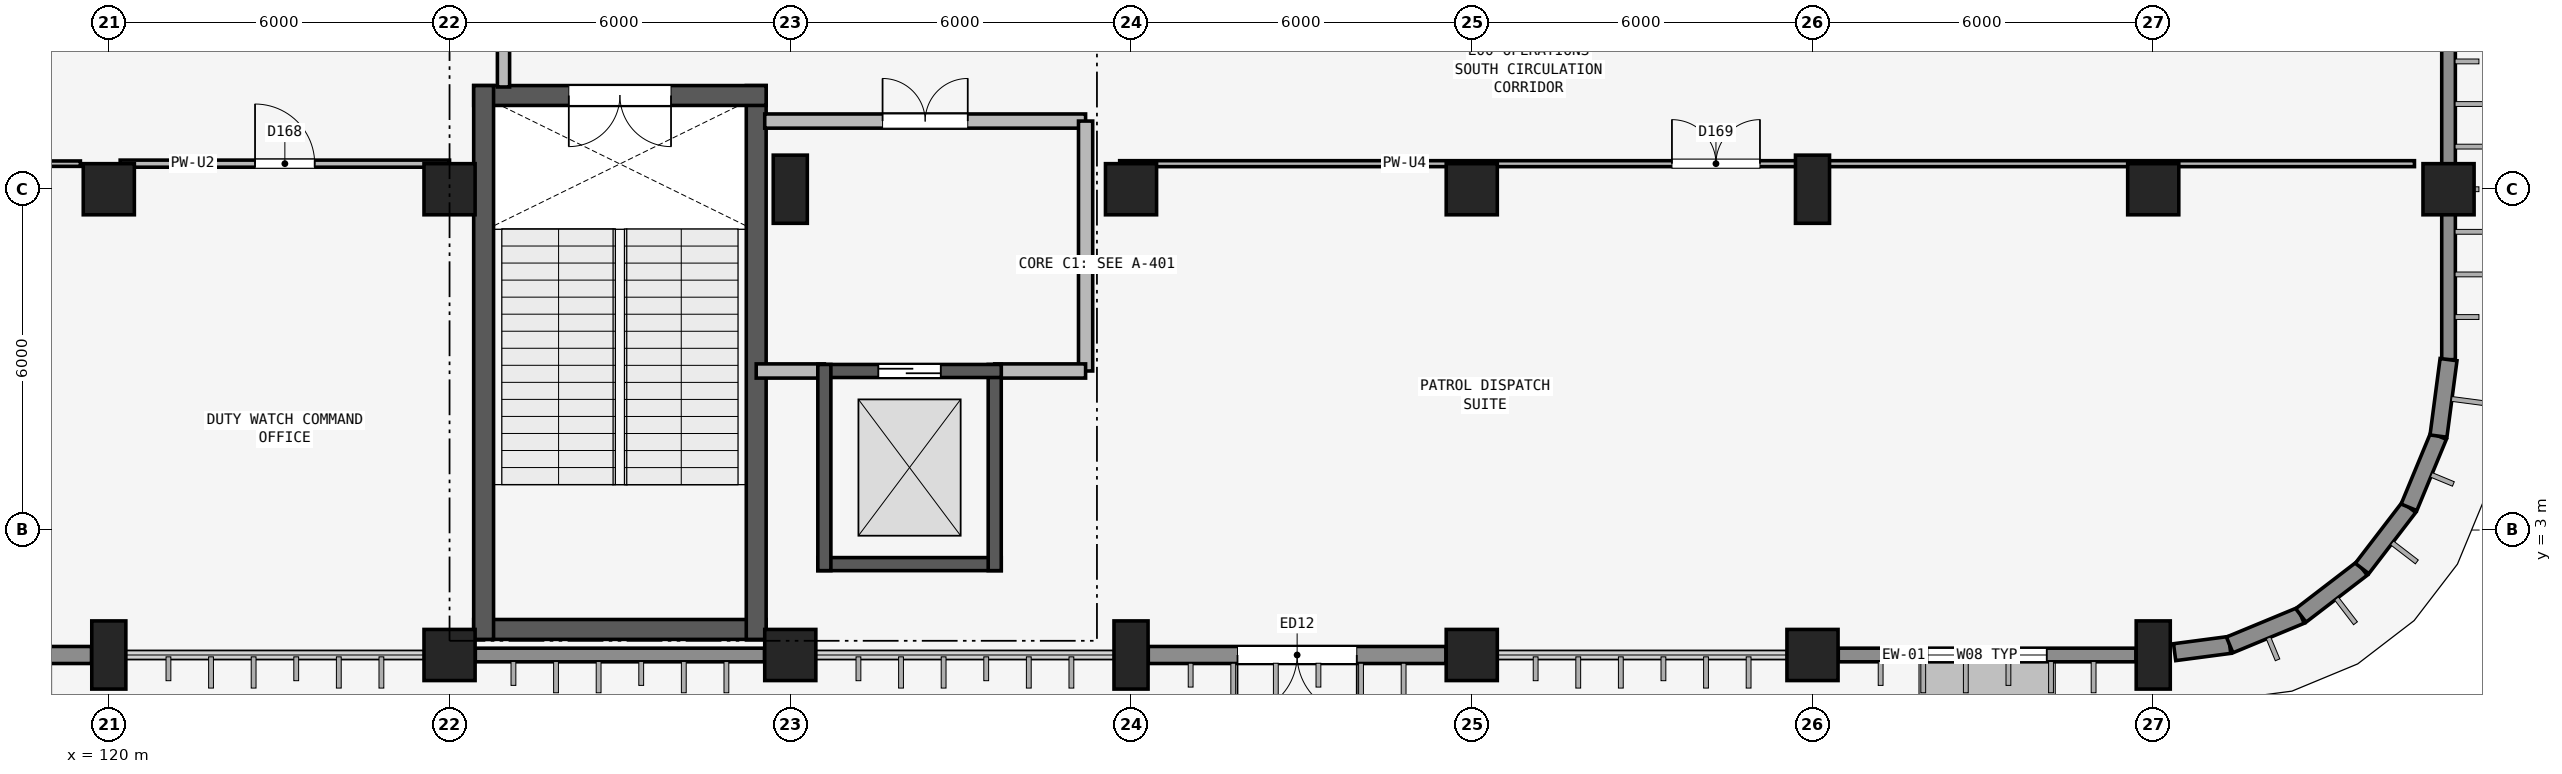
"""IFC4 building model, lengths in metres.
Left out: names, types, materials, properties, quantities, classifications, styles, units other than length and angle.
Written with IfcOpenShell. Run it as: python <this file> out.ifc"""

import sys

from ifc_helpers import new_model, si_unit, direction, frame, frame_2d, origin, origin_2d, place, context, subcontext, project, spatial, rectangle, extrude, element, fill, save


model = new_model("IFC4")
c1 = context("Model", 3, precision=1e-05, world=origin(), true_north=direction((0.0, 1.0)))
c2 = subcontext(c1, "Body", "Model", "MODEL_VIEW")
j1 = project(units=[si_unit("LENGTHUNIT", "METRE"), si_unit("PLANEANGLEUNIT", "RADIAN")], contexts=[c1])
p1 = place(None, origin())
s1 = spatial("IfcSite", under=j1, at=p1, CompositionType="ELEMENT")
p2 = place(p1, origin())
s2 = spatial("IfcBuilding", under=s1, at=p2, CompositionType="ELEMENT")
p3 = place(p2, origin())
s3 = spatial("IfcBuildingStorey", under=s2, at=p3, CompositionType="ELEMENT", Elevation=0.0)
p4 = place(p3, frame((120.0, 0.8, 0.0), z_axis=(0.0, 0.0, 1.0), x_axis=(1.0, 0.0, 0.0)))
e1 = element("IfcColumn", 1, at=p4, inside=s3, PredefinedType="COLUMN", context=c2, shape_type="SweptSolid", body=[
    extrude(rectangle(XDim=0.6, YDim=1.2, at=origin_2d()), origin(), (0.0, 0.0, 1.0), 4.8),
])
for number, where, z_axis, x_axis in (
    (2, (120.0, 9.0, 0.0), (0.0, 0.0, 1.0), (1.0, 0.0, 0.0)),
    (3, (126.0, 0.8, 0.0), (0.0, 0.0, 1.0), (1.0, 0.0, 0.0)),
    (4, (126.0, 9.0, 0.0), (0.0, 0.0, 1.0), (1.0, 0.0, 0.0)),
    (5, (132.0, 0.8, 0.0), (0.0, 0.0, 1.0), (1.0, 0.0, 0.0)),
):
    element("IfcColumn", number, at=place(p3, frame(where, z_axis=z_axis, x_axis=x_axis)), inside=s3, PredefinedType="COLUMN", context=c2, shape_type="SweptSolid", body=[
        extrude(rectangle(XDim=0.9, YDim=0.9, at=origin_2d()), origin(), (0.0, 0.0, 1.0), 4.8),
    ])
for number, where, z_axis, x_axis in (
    (6, (132.0, 9.0, 0.0), (0.0, 0.0, 1.0), (1.0, 0.0, 0.0)),
    (7, (138.0, 0.8, 0.0), (0.0, 0.0, 1.0), (1.0, 0.0, 0.0)),
):
    element("IfcColumn", number, at=place(p3, frame(where, z_axis=z_axis, x_axis=x_axis)), inside=s3, PredefinedType="COLUMN", context=c2, shape_type="SweptSolid", body=[
        extrude(rectangle(XDim=0.6, YDim=1.2, at=origin_2d()), origin(), (0.0, 0.0, 1.0), 4.8),
    ])
for number, where, z_axis, x_axis in (
    (8, (138.0, 9.0, 0.0), (0.0, 0.0, 1.0), (1.0, 0.0, 0.0)),
    (9, (144.0, 0.8, 0.0), (0.0, 0.0, 1.0), (1.0, 0.0, 0.0)),
    (10, (144.0, 9.0, 0.0), (0.0, 0.0, 1.0), (1.0, 0.0, 0.0)),
    (11, (150.0, 0.8, 0.0), (0.0, 0.0, 1.0), (1.0, 0.0, 0.0)),
):
    element("IfcColumn", number, at=place(p3, frame(where, z_axis=z_axis, x_axis=x_axis)), inside=s3, PredefinedType="COLUMN", context=c2, shape_type="SweptSolid", body=[
        extrude(rectangle(XDim=0.9, YDim=0.9, at=origin_2d()), origin(), (0.0, 0.0, 1.0), 4.8),
    ])
for number, where, z_axis, x_axis in (
    (12, (150.0, 9.0, 0.0), (0.0, 0.0, 1.0), (1.0, 0.0, 0.0)),
    (13, (156.0, 0.8, 0.0), (0.0, 0.0, 1.0), (1.0, 0.0, 0.0)),
):
    element("IfcColumn", number, at=place(p3, frame(where, z_axis=z_axis, x_axis=x_axis)), inside=s3, PredefinedType="COLUMN", context=c2, shape_type="SweptSolid", body=[
        extrude(rectangle(XDim=0.6, YDim=1.2, at=origin_2d()), origin(), (0.0, 0.0, 1.0), 4.8),
    ])
for number, where, z_axis, x_axis in (
    (14, (156.0, 9.0, 0.0), (0.0, 0.0, 1.0), (1.0, 0.0, 0.0)),
    (15, (161.2, 9.0, 0.0), (0.0, 0.0, 1.0), (1.0, 0.0, 0.0)),
):
    element("IfcColumn", number, at=place(p3, frame(where, z_axis=z_axis, x_axis=x_axis)), inside=s3, PredefinedType="COLUMN", context=c2, shape_type="SweptSolid", body=[
        extrude(rectangle(XDim=0.9, YDim=0.9, at=origin_2d()), origin(), (0.0, 0.0, 1.0), 4.8),
    ])
p5 = place(p3, frame((114.454, 0.8, 0.0), z_axis=(0.0, 0.0, 1.0), x_axis=(1.0, 0.0, 0.0)))
e16 = element("IfcWall", 16, at=p5, inside=s3, PredefinedType="SOLIDWALL", context=c2, shape_type="SweptSolid", body=[
    extrude(rectangle(XDim=5.242, YDim=0.3, at=frame_2d((2.621, 0.0))), origin(), (0.0, 0.0, 1.0), 4.14),
])
p6 = place(p5, frame((1.571, 0.0, 0.0)))
e17 = element("IfcOpeningElement", 17, at=p6, cuts=e16, PredefinedType="OPENING", context=c2, shape_type="SweptSolid", body=[
    extrude(rectangle(XDim=2.1, YDim=2.4, at=frame_2d((1.05, 1.2))), frame((0.0, 0.16, 0.0), z_axis=(0.0, -1.0, 0.0), x_axis=(1.0, 0.0, 0.0)), (0.0, 0.0, 1.0), 0.32),
])
p7 = place(p3, frame((126.454, 0.8, 0.0), z_axis=(0.0, 0.0, 1.0), x_axis=(1.0, 0.0, 0.0)))
e18 = element("IfcWall", 18, at=p7, inside=s3, PredefinedType="SOLIDWALL", context=c2, shape_type="SweptSolid", body=[
    extrude(rectangle(XDim=5.092, YDim=0.24, at=frame_2d((2.546, 0.0))), origin(), (0.0, 0.0, 1.0), 4.19),
])
p8 = place(p3, frame((138.304, 0.8, 0.0), z_axis=(0.0, 0.0, 1.0), x_axis=(1.0, 0.0, 0.0)))
e19 = element("IfcWall", 19, at=p8, inside=s3, PredefinedType="SOLIDWALL", context=c2, shape_type="SweptSolid", body=[
    extrude(rectangle(XDim=5.242, YDim=0.3, at=frame_2d((2.621, 0.0))), origin(), (0.0, 0.0, 1.0), 4.14),
])
p9 = place(p8, frame((1.571, 0.0, 0.0)))
e20 = element("IfcOpeningElement", 20, at=p9, cuts=e19, PredefinedType="OPENING", context=c2, shape_type="SweptSolid", body=[
    extrude(rectangle(XDim=2.1, YDim=2.4, at=frame_2d((1.05, 1.2))), frame((0.0, 0.16, 0.0), z_axis=(0.0, -1.0, 0.0), x_axis=(1.0, 0.0, 0.0)), (0.0, 0.0, 1.0), 0.32),
])
p10 = place(p3, frame((150.454, 0.8, 0.0), z_axis=(0.0, 0.0, 1.0), x_axis=(1.0, 0.0, 0.0)))
e21 = element("IfcWall", 21, at=p10, inside=s3, PredefinedType="SOLIDWALL", context=c2, shape_type="SweptSolid", body=[
    extrude(rectangle(XDim=5.242, YDim=0.24, at=frame_2d((2.621, 0.0))), origin(), (0.0, 0.0, 1.0), 4.24),
])
p11 = place(p10, frame((1.571, 0.0, 0.9)))
e22 = element("IfcOpeningElement", 22, at=p11, cuts=e21, PredefinedType="OPENING", context=c2, shape_type="SweptSolid", body=[
    extrude(rectangle(XDim=2.1, YDim=1.5, at=frame_2d((1.05, 0.75))), frame((0.0, 0.13, 0.0), z_axis=(0.0, -1.0, 0.0), x_axis=(1.0, 0.0, 0.0)), (0.0, 0.0, 1.0), 0.26),
])
p12 = place(p3, frame((161.2, 6.0, 0.0), z_axis=(0.0, 0.0, 1.0), x_axis=(0.0, 1.0, 0.0)))
e23 = element("IfcWall", 23, at=p12, inside=s3, PredefinedType="SOLIDWALL", context=c2, shape_type="SweptSolid", body=[
    extrude(rectangle(XDim=6.0, YDim=0.24, at=frame_2d((3.0, 0.0))), origin(), (0.0, 0.0, 1.0), 3.94),
])
p13 = place(p3, frame((156.376, 0.85, 0.0), z_axis=(0.0, 0.0, 1.0), x_axis=(0.991438141852, 0.130577221906, 0.0)))
e24 = element("IfcWall", 24, at=p13, inside=s3, PredefinedType="SOLIDWALL", context=c2, shape_type="SweptSolid", body=[
    extrude(rectangle(XDim=0.978, YDim=0.3, at=frame_2d((0.489, 0.0))), origin(), (0.0, 0.0, 1.0), 4.495),
])
for number, where, z_axis, x_axis in (
    (25, (157.346, 0.977, 0.0), (0.0, 0.0, 1.0), (0.924, 0.383, 0.0)),
    (26, (158.6, 1.497, 0.0), (0.0, 0.0, 1.0), (0.793, 0.609, 0.0)),
    (27, (159.677, 2.323, 0.0), (0.0, 0.0, 1.0), (0.609, 0.793, 0.0)),
    (28, (160.503, 3.4, 0.0), (0.0, 0.0, 1.0), (0.383, 0.924, 0.0)),
):
    element("IfcWall", number, at=place(p3, frame(where, z_axis=z_axis, x_axis=x_axis)), inside=s3, PredefinedType="SOLIDWALL", context=c2, shape_type="SweptSolid", body=[
        extrude(rectangle(XDim=1.357, YDim=0.3, at=frame_2d((0.679, 0.0))), origin(), (0.0, 0.0, 1.0), 4.495),
    ])
p14 = place(p3, frame((161.023, 4.654, 0.0), z_axis=(0.0, 0.0, 1.0), x_axis=(0.130561507967, 0.991440211328, 0.0)))
e29 = element("IfcWall", 29, at=p14, inside=s3, PredefinedType="SOLIDWALL", context=c2, shape_type="SweptSolid", body=[
    extrude(rectangle(XDim=1.358, YDim=0.3, at=frame_2d((0.679, 0.0))), origin(), (0.0, 0.0, 1.0), 4.495),
])
p15 = place(p3, frame((126.425, 1.25, 0.0), z_axis=(0.0, 0.0, 1.0), x_axis=(1.0, 0.0, 0.0)))
e30 = element("IfcWall", 30, at=p15, inside=s3, PredefinedType="SHEAR", context=c2, shape_type="SweptSolid", body=[
    extrude(rectangle(XDim=5.15, YDim=0.35, at=frame_2d((2.575, 0.0))), origin(), (0.0, 0.0, 1.0), 4.66),
])
p16 = place(p3, frame((131.4, 1.075, 0.0), z_axis=(0.0, 0.0, 1.0), x_axis=(0.0, 1.0, 0.0)))
e31 = element("IfcWall", 31, at=p16, inside=s3, PredefinedType="SHEAR", context=c2, shape_type="SweptSolid", body=[
    extrude(rectangle(XDim=9.75, YDim=0.35, at=frame_2d((4.875, 0.0))), origin(), (0.0, 0.0, 1.0), 4.66),
])
p17 = place(p3, frame((131.575, 10.65, 0.0), z_axis=(0.0, 0.0, 1.0), x_axis=(-1.0, 0.0, 0.0)))
e32 = element("IfcWall", 32, at=p17, inside=s3, PredefinedType="SHEAR", context=c2, shape_type="SweptSolid", body=[
    extrude(rectangle(XDim=5.15, YDim=0.35, at=frame_2d((2.575, 0.0))), origin(), (0.0, 0.0, 1.0), 4.66),
])
p18 = place(p17, frame((1.675, 0.0, 0.0)))
e33 = element("IfcOpeningElement", 33, at=p18, cuts=e32, PredefinedType="OPENING", context=c2, shape_type="SweptSolid", body=[
    extrude(rectangle(XDim=1.8, YDim=2.2, at=frame_2d((0.9, 1.1))), frame((0.0, 0.185, 0.0), z_axis=(0.0, -1.0, 0.0), x_axis=(1.0, 0.0, 0.0)), (0.0, 0.0, 1.0), 0.37),
])
p19 = place(p3, frame((126.6, 10.825, 0.0), z_axis=(0.0, 0.0, 1.0), x_axis=(0.0, -1.0, 0.0)))
e34 = element("IfcWall", 34, at=p19, inside=s3, PredefinedType="SHEAR", context=c2, shape_type="SweptSolid", body=[
    extrude(rectangle(XDim=9.75, YDim=0.35, at=frame_2d((4.875, 0.0))), origin(), (0.0, 0.0, 1.0), 4.66),
])
p20 = place(p3, frame((131.55, 10.2, 0.0), z_axis=(0.0, 0.0, 1.0), x_axis=(1.0, 0.0, 0.0)))
e35 = element("IfcWall", 35, at=p20, inside=s3, PredefinedType="PARTITIONING", context=c2, shape_type="SweptSolid", body=[
    extrude(rectangle(XDim=5.65, YDim=0.25, at=frame_2d((2.825, 0.0))), origin(), (0.0, 0.0, 1.0), 4.09),
])
p21 = place(p20, frame((2.075, 0.0, 0.0)))
e36 = element("IfcOpeningElement", 36, at=p21, cuts=e35, PredefinedType="OPENING", context=c2, shape_type="SweptSolid", body=[
    extrude(rectangle(XDim=1.5, YDim=2.15, at=frame_2d((0.75, 1.075))), frame((0.0, 0.135, 0.0), z_axis=(0.0, -1.0, 0.0), x_axis=(1.0, 0.0, 0.0)), (0.0, 0.0, 1.0), 0.27),
])
p22 = place(p3, frame((137.2, 5.8, 0.0), z_axis=(0.0, 0.0, 1.0), x_axis=(0.0, 1.0, 0.0)))
e37 = element("IfcWall", 37, at=p22, inside=s3, PredefinedType="PARTITIONING", context=c2, shape_type="SweptSolid", body=[
    extrude(rectangle(XDim=4.4, YDim=0.25, at=frame_2d((2.2, 0.0))), origin(), (0.0, 0.0, 1.0), 4.09),
])
p23 = place(p3, frame((135.6, 5.8, 0.0), z_axis=(0.0, 0.0, 1.0), x_axis=(1.0, 0.0, 0.0)))
e38 = element("IfcWall", 38, at=p23, inside=s3, PredefinedType="PARTITIONING", context=c2, shape_type="SweptSolid", body=[
    extrude(rectangle(XDim=1.6, YDim=0.25, at=frame_2d((0.8, 0.0))), origin(), (0.0, 0.0, 1.0), 4.49),
])
p24 = place(p3, frame((131.4, 5.8, 0.0), z_axis=(0.0, 0.0, 1.0), x_axis=(1.0, 0.0, 0.0)))
e39 = element("IfcWall", 39, at=p24, inside=s3, PredefinedType="PARTITIONING", context=c2, shape_type="SweptSolid", body=[
    extrude(rectangle(XDim=1.2, YDim=0.25, at=frame_2d((0.6, 0.0))), origin(), (0.0, 0.0, 1.0), 4.04),
])
p25 = place(p3, frame((132.485, 2.4, 0.0), z_axis=(0.0, 0.0, 1.0), x_axis=(1.0, 0.0, 0.0)))
e40 = element("IfcWall", 40, at=p25, inside=s3, PredefinedType="SHEAR", context=c2, shape_type="SweptSolid", body=[
    extrude(rectangle(XDim=3.23, YDim=0.23, at=frame_2d((1.615, 0.0))), origin(), (0.0, 0.0, 1.0), 4.8),
])
p26 = place(p3, frame((135.6, 2.285, 0.0), z_axis=(0.0, 0.0, 1.0), x_axis=(0.0, 1.0, 0.0)))
e41 = element("IfcWall", 41, at=p26, inside=s3, PredefinedType="SHEAR", context=c2, shape_type="SweptSolid", body=[
    extrude(rectangle(XDim=3.63, YDim=0.23, at=frame_2d((1.815, 0.0))), origin(), (0.0, 0.0, 1.0), 4.8),
])
p27 = place(p3, frame((135.715, 5.8, 0.0), z_axis=(0.0, 0.0, 1.0), x_axis=(-1.0, 0.0, 0.0)))
e42 = element("IfcWall", 42, at=p27, inside=s3, PredefinedType="SHEAR", context=c2, shape_type="SweptSolid", body=[
    extrude(rectangle(XDim=3.23, YDim=0.23, at=frame_2d((1.615, 0.0))), origin(), (0.0, 0.0, 1.0), 4.8),
])
p28 = place(p27, frame((1.065, 0.0, 0.0)))
e43 = element("IfcOpeningElement", 43, at=p28, cuts=e42, PredefinedType="OPENING", context=c2, shape_type="SweptSolid", body=[
    extrude(rectangle(XDim=1.1, YDim=2.2, at=frame_2d((0.55, 1.1))), frame((0.0, 0.125, 0.0), z_axis=(0.0, -1.0, 0.0), x_axis=(1.0, 0.0, 0.0)), (0.0, 0.0, 1.0), 0.25),
])
p29 = place(p3, frame((132.6, 5.915, 0.0), z_axis=(0.0, 0.0, 1.0), x_axis=(0.0, -1.0, 0.0)))
e44 = element("IfcWall", 44, at=p29, inside=s3, PredefinedType="SHEAR", context=c2, shape_type="SweptSolid", body=[
    extrude(rectangle(XDim=3.63, YDim=0.23, at=frame_2d((1.815, 0.0))), origin(), (0.0, 0.0, 1.0), 4.8),
])
p30 = place(p3, frame((126.95, 10.8, 0.0), z_axis=(0.0, 0.0, 1.0), x_axis=(0.0, 1.0, 0.0)))
e45 = element("IfcWall", 45, at=p30, inside=s3, PredefinedType="PARTITIONING", context=c2, shape_type="SweptSolid", body=[
    extrude(rectangle(XDim=1.8, YDim=0.215, at=frame_2d((0.9, 0.0))), origin(), (0.0, 0.0, 1.0), 4.49),
])
p31 = place(p3, frame((108.5, 9.45, 0.0), z_axis=(0.0, 0.0, 1.0), x_axis=(1.0, 0.0, 0.0)))
e46 = element("IfcWall", 46, at=p31, inside=s3, PredefinedType="PARTITIONING", context=c2, shape_type="SweptSolid", body=[
    extrude(rectangle(XDim=11.0, YDim=0.095, at=frame_2d((5.5, 0.0))), origin(), (0.0, 0.0, 1.0), 4.09),
])
p32 = place(p31, frame((6.375, 0.0, 0.0)))
e47 = element("IfcOpeningElement", 47, at=p32, cuts=e46, PredefinedType="OPENING", context=c2, shape_type="SweptSolid", body=[
    extrude(rectangle(XDim=0.95, YDim=2.15, at=frame_2d((0.475, 1.075))), frame((0.0, 0.057, 0.0), z_axis=(0.0, -1.0, 0.0), x_axis=(1.0, 0.0, 0.0)), (0.0, 0.0, 1.0), 0.115),
])
p33 = place(p31, frame((7.975, 0.0, 1.15)))
e48 = element("IfcOpeningElement", 48, at=p33, cuts=e46, PredefinedType="OPENING", context=c2, shape_type="SweptSolid", body=[
    extrude(rectangle(XDim=1.2, YDim=0.9, at=frame_2d((0.6, 0.45))), frame((0.0, 0.057, 0.0), z_axis=(0.0, -1.0, 0.0), x_axis=(1.0, 0.0, 0.0)), (0.0, 0.0, 1.0), 0.115),
])
p34 = place(p3, frame((120.2, 9.45, 0.0), z_axis=(0.0, 0.0, 1.0), x_axis=(1.0, 0.0, 0.0)))
e49 = element("IfcWall", 49, at=p34, inside=s3, PredefinedType="PARTITIONING", context=c2, shape_type="SweptSolid", body=[
    extrude(rectangle(XDim=5.8, YDim=0.125, at=frame_2d((2.9, 0.0))), origin(), (0.0, 0.0, 1.0), 4.09),
])
p35 = place(p34, frame((2.375, 0.0, 0.0)))
e50 = element("IfcOpeningElement", 50, at=p35, cuts=e49, PredefinedType="OPENING", context=c2, shape_type="SweptSolid", body=[
    extrude(rectangle(XDim=1.05, YDim=2.2, at=frame_2d((0.525, 1.1))), frame((0.0, 0.073, 0.0), z_axis=(0.0, -1.0, 0.0), x_axis=(1.0, 0.0, 0.0)), (0.0, 0.0, 1.0), 0.145),
])
p36 = place(p3, frame((137.8, 9.45, 0.0), z_axis=(0.0, 0.0, 1.0), x_axis=(1.0, 0.0, 0.0)))
e51 = element("IfcWall", 51, at=p36, inside=s3, PredefinedType="PARTITIONING", context=c2, shape_type="SweptSolid", body=[
    extrude(rectangle(XDim=22.8, YDim=0.105, at=frame_2d((11.4, 0.0))), origin(), (0.0, 0.0, 1.0), 4.09),
])
p37 = place(p36, frame((9.725, 0.0, 0.0)))
e52 = element("IfcOpeningElement", 52, at=p37, cuts=e51, PredefinedType="OPENING", context=c2, shape_type="SweptSolid", body=[
    extrude(rectangle(XDim=1.55, YDim=2.2, at=frame_2d((0.775, 1.1))), frame((0.0, 0.062, 0.0), z_axis=(0.0, -1.0, 0.0), x_axis=(1.0, 0.0, 0.0)), (0.0, 0.0, 1.0), 0.125),
])
p38 = place(p9, frame((2.1, 0.0, 0.0), z_axis=(0.0, 0.0, 1.0), x_axis=(-1.0, 0.0, 0.0)))
e53 = element("IfcDoor", 53, at=p38, inside=s3, OperationType="DOUBLE_DOOR_SINGLE_SWING", PredefinedType="DOOR", context=c2, shape_type="SweptSolid", body=[
    extrude(rectangle(XDim=2.1, YDim=2.4, at=frame_2d((1.05, 1.2))), frame((0.0, 0.025, 0.0), z_axis=(0.0, -1.0, 0.0), x_axis=(1.0, 0.0, 0.0)), (0.0, 0.0, 1.0), 0.05),
])
fill(e20, e53)
p39 = place(p11, origin())
e54 = element("IfcWindow", 54, at=p39, inside=s3, PartitioningType="SINGLE_PANEL", PredefinedType="WINDOW", context=c2, shape_type="SweptSolid", body=[
    extrude(rectangle(XDim=2.1, YDim=1.5, at=frame_2d((1.05, 0.75))), frame((0.0, 0.03, 0.0), z_axis=(0.0, -1.0, 0.0), x_axis=(1.0, 0.0, 0.0)), (0.0, 0.0, 1.0), 0.06),
])
fill(e22, e54)
p40 = place(p18, origin())
e55 = element("IfcDoor", 55, at=p40, inside=s3, OperationType="DOUBLE_DOOR_SINGLE_SWING", PredefinedType="DOOR", context=c2, shape_type="SweptSolid", body=[
    extrude(rectangle(XDim=1.8, YDim=2.2, at=frame_2d((0.9, 1.1))), frame((0.0, 0.025, 0.0), z_axis=(0.0, -1.0, 0.0), x_axis=(1.0, 0.0, 0.0)), (0.0, 0.0, 1.0), 0.05),
])
fill(e33, e55)
p41 = place(p21, origin())
e56 = element("IfcDoor", 56, at=p41, inside=s3, OperationType="DOUBLE_DOOR_SINGLE_SWING", PredefinedType="DOOR", context=c2, shape_type="SweptSolid", body=[
    extrude(rectangle(XDim=1.5, YDim=2.15, at=frame_2d((0.75, 1.075))), frame((0.0, 0.025, 0.0), z_axis=(0.0, -1.0, 0.0), x_axis=(1.0, 0.0, 0.0)), (0.0, 0.0, 1.0), 0.05),
])
fill(e36, e56)
p42 = place(p28, origin())
e57 = element("IfcDoor", 57, at=p42, inside=s3, OperationType="SLIDING_TO_LEFT", PredefinedType="DOOR", context=c2, shape_type="SweptSolid", body=[
    extrude(rectangle(XDim=1.1, YDim=2.2, at=frame_2d((0.55, 1.1))), frame((0.0, 0.025, 0.0), z_axis=(0.0, -1.0, 0.0), x_axis=(1.0, 0.0, 0.0)), (0.0, 0.0, 1.0), 0.05),
])
fill(e43, e57)
p43 = place(p35, origin())
e58 = element("IfcDoor", 58, at=p43, inside=s3, OperationType="SINGLE_SWING_LEFT", PredefinedType="DOOR", context=c2, shape_type="SweptSolid", body=[
    extrude(rectangle(XDim=1.05, YDim=2.2, at=frame_2d((0.525, 1.1))), frame((0.0, 0.025, 0.0), z_axis=(0.0, -1.0, 0.0), x_axis=(1.0, 0.0, 0.0)), (0.0, 0.0, 1.0), 0.05),
])
fill(e50, e58)
p44 = place(p37, origin())
e59 = element("IfcDoor", 59, at=p44, inside=s3, OperationType="DOUBLE_DOOR_SINGLE_SWING", PredefinedType="DOOR", context=c2, shape_type="SweptSolid", body=[
    extrude(rectangle(XDim=1.55, YDim=2.2, at=frame_2d((0.775, 1.1))), frame((0.0, 0.025, 0.0), z_axis=(0.0, -1.0, 0.0), x_axis=(1.0, 0.0, 0.0)), (0.0, 0.0, 1.0), 0.05),
])
fill(e52, e59)
save(model, sys.argv[1])
